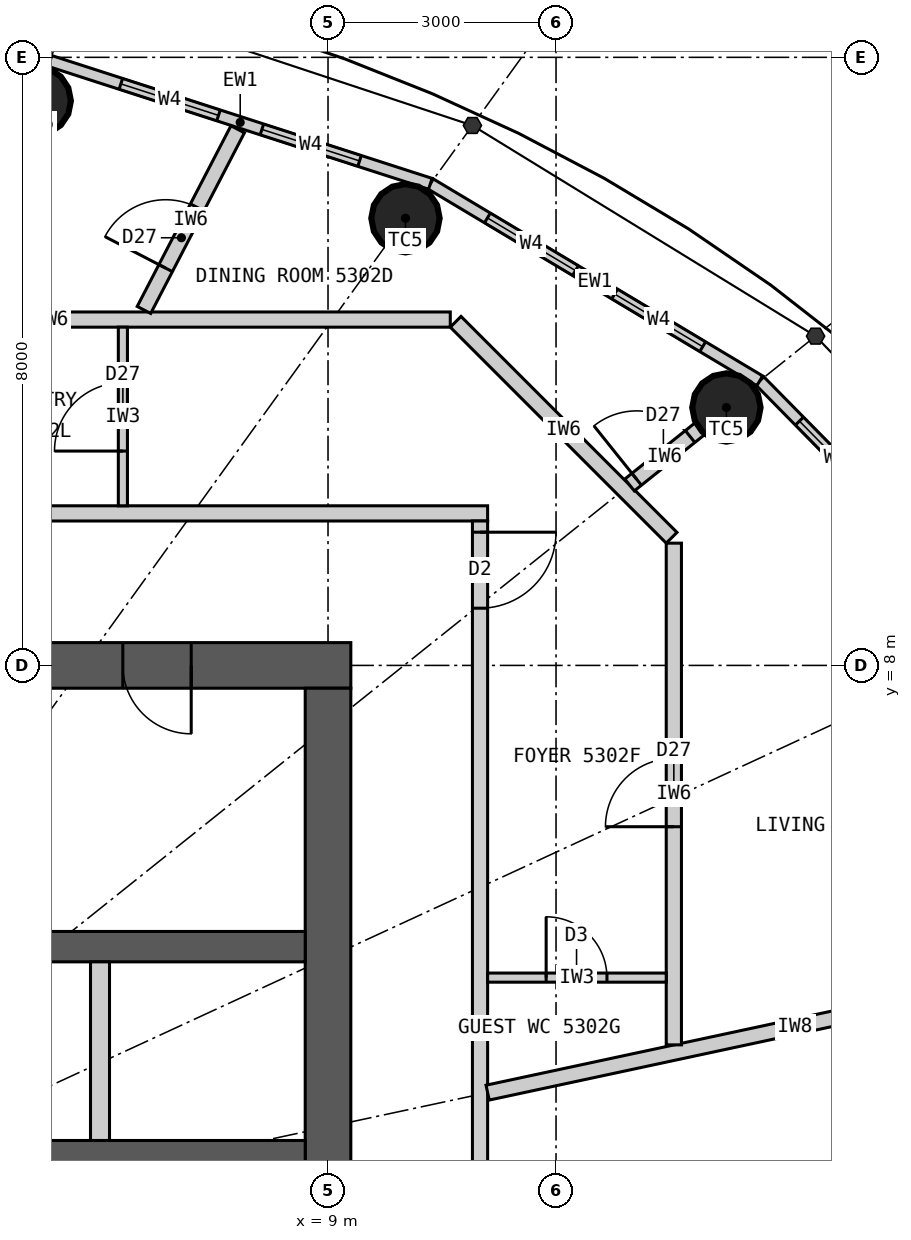
"""IFC4 building model, lengths in metres.
Left out: names, types, materials, properties, quantities, classifications, styles, units other than length and angle.
Written with IfcOpenShell. Run it as: python <this file> out.ifc"""

import sys

from ifc_helpers import new_model, si_unit, direction, frame, frame_2d, origin, origin_2d, place, context, subcontext, project, spatial, rectangle, circle, extrude, element, fill, save


model = new_model("IFC4")
c1 = context("Model", 3, precision=1e-05, world=origin(), true_north=direction((0.0, 1.0)))
c2 = subcontext(c1, "Body", "Model", "MODEL_VIEW")
j1 = project(units=[si_unit("LENGTHUNIT", "METRE"), si_unit("PLANEANGLEUNIT", "RADIAN")], contexts=[c1])
p1 = place(None, origin())
s1 = spatial("IfcSite", under=j1, at=p1, CompositionType="ELEMENT")
p2 = place(p1, origin())
s2 = spatial("IfcBuilding", under=s1, at=p2, CompositionType="ELEMENT")
p3 = place(p2, frame((0.0, 0.0, 199.5)))
s3 = spatial("IfcBuildingStorey", under=s2, at=p3, CompositionType="ELEMENT", Elevation=199.5)
for number, where, z_axis, x_axis in (
    (1, (14.241, 11.393, 0.0), (0.0, 0.0, 1.0), (1.0, 0.0, 0.0)),
    (2, (10.019, 13.883, 0.0), (0.0, 0.0, 1.0), (1.0, 0.0, 0.0)),
    (3, (5.167, 15.427, 0.0), (0.0, 0.0, 1.0), (1.0, 0.0, 0.0)),
):
    element("IfcColumn", number, at=place(p3, frame(where, z_axis=z_axis, x_axis=x_axis)), inside=s3, PredefinedType="COLUMN", context=c2, shape_type="SweptSolid", body=[
        extrude(circle(Radius=0.45, at=origin_2d()), origin(), (0.0, 0.0, 1.0), 3.3),
    ])
p4 = place(p3, frame((-9.3, 8.0, 0.0), z_axis=(0.0, 0.0, 1.0), x_axis=(1.0, 0.0, 0.0)))
e4 = element("IfcWall", 4, at=p4, inside=s3, PredefinedType="SHEAR", context=c2, shape_type="SweptSolid", body=[
    extrude(rectangle(XDim=18.6, YDim=0.6, at=frame_2d((9.3, 0.0))), origin(), (0.0, 0.0, 1.0), 3.3),
])
p5 = place(p4, frame((8.0, 0.0, 0.0)))
e5 = element("IfcOpeningElement", 5, at=p5, cuts=e4, PredefinedType="OPENING", context=c2, shape_type="SweptSolid", body=[
    extrude(rectangle(XDim=1.2, YDim=2.2, at=frame_2d((0.6, 1.1))), frame((0.0, 0.31, 0.0), z_axis=(0.0, -1.0, 0.0), x_axis=(1.0, 0.0, 0.0)), (0.0, 0.0, 1.0), 0.62),
])
p6 = place(p4, frame((15.6, 0.0, 0.0)))
e6 = element("IfcOpeningElement", 6, at=p6, cuts=e4, PredefinedType="OPENING", context=c2, shape_type="SweptSolid", body=[
    extrude(rectangle(XDim=0.9, YDim=2.2, at=frame_2d((0.45, 1.1))), frame((0.0, 0.31, 0.0), z_axis=(0.0, -1.0, 0.0), x_axis=(1.0, 0.0, 0.0)), (0.0, 0.0, 1.0), 0.62),
])
p7 = place(p3, frame((9.0, -7.7, 0.0), z_axis=(0.0, 0.0, 1.0), x_axis=(0.0, 1.0, 0.0)))
e7 = element("IfcWall", 7, at=p7, inside=s3, PredefinedType="SHEAR", context=c2, shape_type="SweptSolid", body=[
    extrude(rectangle(XDim=15.4, YDim=0.6, at=frame_2d((7.7, 0.0))), origin(), (0.0, 0.0, 1.0), 3.3),
])
p8 = place(p7, frame((6.8, 0.0, 0.0)))
e8 = element("IfcOpeningElement", 8, at=p8, cuts=e7, PredefinedType="OPENING", context=c2, shape_type="SweptSolid", body=[
    extrude(rectangle(XDim=1.8, YDim=2.2, at=frame_2d((0.9, 1.1))), frame((0.0, 0.31, 0.0), z_axis=(0.0, -1.0, 0.0), x_axis=(1.0, 0.0, 0.0)), (0.0, 0.0, 1.0), 0.62),
])
p9 = place(p3, frame((-8.7, 4.3, 0.0), z_axis=(0.0, 0.0, 1.0), x_axis=(1.0, 0.0, 0.0)))
e9 = element("IfcWall", 9, at=p9, inside=s3, PredefinedType="SHEAR", context=c2, shape_type="SweptSolid", body=[
    extrude(rectangle(XDim=17.4, YDim=0.4, at=frame_2d((8.7, 0.0))), origin(), (0.0, 0.0, 1.0), 3.3),
])
p10 = place(p3, frame((-8.7, 1.6, 0.0), z_axis=(0.0, 0.0, 1.0), x_axis=(1.0, 0.0, 0.0)))
e10 = element("IfcWall", 10, at=p10, inside=s3, PredefinedType="SHEAR", context=c2, shape_type="SweptSolid", body=[
    extrude(rectangle(XDim=17.4, YDim=0.3, at=frame_2d((8.7, 0.0))), origin(), (0.0, 0.0, 1.0), 3.3),
])
p11 = place(p10, frame((12.65, 0.0, 0.0)))
e11 = element("IfcOpeningElement", 11, at=p11, cuts=e10, PredefinedType="OPENING", context=c2, shape_type="SweptSolid", body=[
    extrude(rectangle(XDim=1.1, YDim=2.2, at=frame_2d((0.55, 1.1))), frame((0.0, 0.16, 0.0), z_axis=(0.0, -1.0, 0.0), x_axis=(1.0, 0.0, 0.0)), (0.0, 0.0, 1.0), 0.32),
])
p12 = place(p10, frame((3.75, 0.0, 0.0)))
e12 = element("IfcOpeningElement", 12, at=p12, cuts=e10, PredefinedType="OPENING", context=c2, shape_type="SweptSolid", body=[
    extrude(rectangle(XDim=0.9, YDim=2.2, at=frame_2d((0.45, 1.1))), frame((0.0, 0.16, 0.0), z_axis=(0.0, -1.0, 0.0), x_axis=(1.0, 0.0, 0.0)), (0.0, 0.0, 1.0), 0.32),
])
p13 = place(p10, frame((9.75, 0.0, 0.0)))
e13 = element("IfcOpeningElement", 13, at=p13, cuts=e10, PredefinedType="OPENING", context=c2, shape_type="SweptSolid", body=[
    extrude(rectangle(XDim=0.9, YDim=2.2, at=frame_2d((0.45, 1.1))), frame((0.0, 0.16, 0.0), z_axis=(0.0, -1.0, 0.0), x_axis=(1.0, 0.0, 0.0)), (0.0, 0.0, 1.0), 0.32),
])
p14 = place(p3, frame((6.0, 1.75, 0.0), z_axis=(0.0, 0.0, 1.0), x_axis=(0.0, 1.0, 0.0)))
e14 = element("IfcWall", 14, at=p14, inside=s3, PredefinedType="PARTITIONING", context=c2, shape_type="SweptSolid", body=[
    extrude(rectangle(XDim=2.35, YDim=0.25, at=frame_2d((1.175, 0.0))), origin(), (0.0, 0.0, 1.0), 3.3),
])
p15 = place(p3, frame((18.04, 8.332, 0.0), z_axis=(0.0, 0.0, 1.0), x_axis=(-0.701527379618, 0.712642501993, 0.0)))
e15 = element("IfcWall", 15, at=p15, inside=s3, PredefinedType="ELEMENTEDWALL", context=c2, shape_type="SweptSolid", body=[
    extrude(rectangle(XDim=4.788, YDim=0.15, at=frame_2d((2.394, 0.0))), origin(), (0.0, 0.0, 1.0), 3.12),
])
p16 = place(p15, frame((0.744, 0.0, 0.9)))
e16 = element("IfcOpeningElement", 16, at=p16, cuts=e15, PredefinedType="OPENING", context=c2, shape_type="SweptSolid", body=[
    extrude(rectangle(XDim=1.35, YDim=1.9, at=frame_2d((0.675, 0.95))), frame((0.0, 0.085, 0.0), z_axis=(0.0, -1.0, 0.0), x_axis=(1.0, 0.0, 0.0)), (0.0, 0.0, 1.0), 0.17),
])
p17 = place(p15, frame((2.694, 0.0, 0.9)))
e17 = element("IfcOpeningElement", 17, at=p17, cuts=e15, PredefinedType="OPENING", context=c2, shape_type="SweptSolid", body=[
    extrude(rectangle(XDim=1.35, YDim=1.9, at=frame_2d((0.675, 0.95))), frame((0.0, 0.085, 0.0), z_axis=(0.0, -1.0, 0.0), x_axis=(1.0, 0.0, 0.0)), (0.0, 0.0, 1.0), 0.17),
])
p18 = place(p3, frame((14.68, 11.744, 0.0), z_axis=(0.0, 0.0, 1.0), x_axis=(-0.85822150553, 0.513279502265, 0.0)))
e18 = element("IfcWall", 18, at=p18, inside=s3, PredefinedType="ELEMENTEDWALL", context=c2, shape_type="SweptSolid", body=[
    extrude(rectangle(XDim=5.05, YDim=0.15, at=frame_2d((2.525, 0.0))), origin(), (0.0, 0.0, 1.0), 3.12),
])
p19 = place(p18, frame((0.875, 0.0, 0.9)))
e19 = element("IfcOpeningElement", 19, at=p19, cuts=e18, PredefinedType="OPENING", context=c2, shape_type="SweptSolid", body=[
    extrude(rectangle(XDim=1.35, YDim=1.9, at=frame_2d((0.675, 0.95))), frame((0.0, 0.085, 0.0), z_axis=(0.0, -1.0, 0.0), x_axis=(1.0, 0.0, 0.0)), (0.0, 0.0, 1.0), 0.17),
])
p20 = place(p18, frame((2.825, 0.0, 0.9)))
e20 = element("IfcOpeningElement", 20, at=p20, cuts=e18, PredefinedType="OPENING", context=c2, shape_type="SweptSolid", body=[
    extrude(rectangle(XDim=1.35, YDim=1.9, at=frame_2d((0.675, 0.95))), frame((0.0, 0.085, 0.0), z_axis=(0.0, -1.0, 0.0), x_axis=(1.0, 0.0, 0.0)), (0.0, 0.0, 1.0), 0.17),
])
p21 = place(p3, frame((10.346, 14.336, 0.0), z_axis=(0.0, 0.0, 1.0), x_axis=(-0.951644702515, 0.307200846638, 0.0)))
e21 = element("IfcWall", 21, at=p21, inside=s3, PredefinedType="ELEMENTEDWALL", context=c2, shape_type="SweptSolid", body=[
    extrude(rectangle(XDim=5.258, YDim=0.15, at=frame_2d((2.629, 0.0))), origin(), (0.0, 0.0, 1.0), 3.12),
])
p22 = place(p21, frame((0.979, 0.0, 0.9)))
e22 = element("IfcOpeningElement", 22, at=p22, cuts=e21, PredefinedType="OPENING", context=c2, shape_type="SweptSolid", body=[
    extrude(rectangle(XDim=1.35, YDim=1.9, at=frame_2d((0.675, 0.95))), frame((0.0, 0.085, 0.0), z_axis=(0.0, -1.0, 0.0), x_axis=(1.0, 0.0, 0.0)), (0.0, 0.0, 1.0), 0.17),
])
p23 = place(p21, frame((2.929, 0.0, 0.9)))
e23 = element("IfcOpeningElement", 23, at=p23, cuts=e21, PredefinedType="OPENING", context=c2, shape_type="SweptSolid", body=[
    extrude(rectangle(XDim=1.35, YDim=1.9, at=frame_2d((0.675, 0.95))), frame((0.0, 0.085, 0.0), z_axis=(0.0, -1.0, 0.0), x_axis=(1.0, 0.0, 0.0)), (0.0, 0.0, 1.0), 0.17),
])
p24 = place(p3, frame((-11.1, 10.0, 0.0), z_axis=(0.0, 0.0, 1.0), x_axis=(1.0, 0.0, 0.0)))
e24 = element("IfcWall", 24, at=p24, inside=s3, PredefinedType="PARTITIONING", context=c2, shape_type="SweptSolid", body=[
    extrude(rectangle(XDim=22.2, YDim=0.2, at=frame_2d((11.1, 0.0))), origin(), (0.0, 0.0, 1.0), 3.12),
])
p25 = place(p24, frame((2.309, 0.0, 0.0)))
e25 = element("IfcOpeningElement", 25, at=p25, cuts=e24, PredefinedType="OPENING", context=c2, shape_type="SweptSolid", body=[
    extrude(rectangle(XDim=1.0, YDim=2.2, at=frame_2d((0.5, 1.1))), frame((0.0, 0.11, 0.0), z_axis=(0.0, -1.0, 0.0), x_axis=(1.0, 0.0, 0.0)), (0.0, 0.0, 1.0), 0.22),
])
p26 = place(p3, frame((11.0, -9.9, 0.0), z_axis=(0.0, 0.0, 1.0), x_axis=(0.0, 1.0, 0.0)))
e26 = element("IfcWall", 26, at=p26, inside=s3, PredefinedType="PARTITIONING", context=c2, shape_type="SweptSolid", body=[
    extrude(rectangle(XDim=19.8, YDim=0.2, at=frame_2d((9.9, 0.0))), origin(), (0.0, 0.0, 1.0), 3.12),
])
p27 = place(p26, frame((10.32, 0.0, 0.0)))
e27 = element("IfcOpeningElement", 27, at=p27, cuts=e26, PredefinedType="OPENING", context=c2, shape_type="SweptSolid", body=[
    extrude(rectangle(XDim=1.0, YDim=2.2, at=frame_2d((0.5, 1.1))), frame((0.0, 0.11, 0.0), z_axis=(0.0, -1.0, 0.0), x_axis=(1.0, 0.0, 0.0)), (0.0, 0.0, 1.0), 0.22),
])
p28 = place(p26, frame((18.653, 0.0, 0.0)))
e28 = element("IfcOpeningElement", 28, at=p28, cuts=e26, PredefinedType="OPENING", context=c2, shape_type="SweptSolid", body=[
    extrude(rectangle(XDim=1.0, YDim=2.2, at=frame_2d((0.5, 1.1))), frame((0.0, 0.11, 0.0), z_axis=(0.0, -1.0, 0.0), x_axis=(1.0, 0.0, 0.0)), (0.0, 0.0, 1.0), 0.22),
])
p29 = place(p26, frame((0.379, 0.0, 0.0)))
e29 = element("IfcOpeningElement", 29, at=p29, cuts=e26, PredefinedType="OPENING", context=c2, shape_type="SweptSolid", body=[
    extrude(rectangle(XDim=1.0, YDim=2.2, at=frame_2d((0.5, 1.1))), frame((0.0, 0.11, 0.0), z_axis=(0.0, -1.0, 0.0), x_axis=(1.0, 0.0, 0.0)), (0.0, 0.0, 1.0), 0.22),
])
p30 = place(p3, frame((11.1, 2.379, 0.0), z_axis=(0.0, 0.0, 1.0), x_axis=(0.977789888126, 0.209587534647, 0.0)))
e30 = element("IfcWall", 30, at=p30, inside=s3, PredefinedType="PARTITIONING", context=c2, shape_type="SweptSolid", body=[
    extrude(rectangle(XDim=8.273, YDim=0.2, at=frame_2d((4.136, 0.0))), origin(), (0.0, 0.0, 1.0), 2.42),
])
p31 = place(p3, frame((13.55, 3.008, 0.0), z_axis=(0.0, 0.0, 1.0), x_axis=(0.0, 1.0, 0.0)))
e31 = element("IfcWall", 31, at=p31, inside=s3, PredefinedType="PARTITIONING", context=c2, shape_type="SweptSolid", body=[
    extrude(rectangle(XDim=6.601, YDim=0.2, at=frame_2d((3.3, 0.0))), origin(), (0.0, 0.0, 1.0), 3.12),
])
p32 = place(p31, frame((2.87, 0.0, 0.0)))
e32 = element("IfcOpeningElement", 32, at=p32, cuts=e31, PredefinedType="OPENING", context=c2, shape_type="SweptSolid", body=[
    extrude(rectangle(XDim=0.9, YDim=2.1, at=frame_2d((0.45, 1.05))), frame((0.0, 0.11, 0.0), z_axis=(0.0, -1.0, 0.0), x_axis=(1.0, 0.0, 0.0)), (0.0, 0.0, 1.0), 0.22),
])
p33 = place(p3, frame((13.521, 9.679, 0.0), z_axis=(0.0, 0.0, 1.0), x_axis=(-0.707106781187, 0.707106781187, 0.0)))
e33 = element("IfcWall", 33, at=p33, inside=s3, PredefinedType="PARTITIONING", context=c2, shape_type="SweptSolid", body=[
    extrude(rectangle(XDim=4.019, YDim=0.2, at=frame_2d((2.009, 0.0))), origin(), (0.0, 0.0, 1.0), 3.12),
])
p34 = place(p3, frame((10.609, 12.55, 0.0), z_axis=(0.0, 0.0, 1.0), x_axis=(-1.0, 0.0, 0.0)))
e34 = element("IfcWall", 34, at=p34, inside=s3, PredefinedType="PARTITIONING", context=c2, shape_type="SweptSolid", body=[
    extrude(rectangle(XDim=10.508, YDim=0.2, at=frame_2d((5.254, 0.0))), origin(), (0.0, 0.0, 1.0), 3.12),
])
p35 = place(p34, frame((6.588, 0.0, 0.0)))
e35 = element("IfcOpeningElement", 35, at=p35, cuts=e34, PredefinedType="OPENING", context=c2, shape_type="SweptSolid", body=[
    extrude(rectangle(XDim=0.9, YDim=2.1, at=frame_2d((0.45, 1.05))), frame((0.0, 0.11, 0.0), z_axis=(0.0, -1.0, 0.0), x_axis=(1.0, 0.0, 0.0)), (0.0, 0.0, 1.0), 0.22),
])
p36 = place(p34, frame((8.308, 0.0, 0.0)))
e36 = element("IfcOpeningElement", 36, at=p36, cuts=e34, PredefinedType="OPENING", context=c2, shape_type="SweptSolid", body=[
    extrude(rectangle(XDim=0.8, YDim=2.1, at=frame_2d((0.4, 1.05))), frame((0.0, 0.11, 0.0), z_axis=(0.0, -1.0, 0.0), x_axis=(1.0, 0.0, 0.0)), (0.0, 0.0, 1.0), 0.22),
])
p37 = place(p3, frame((12.968, 10.374, 0.0), z_axis=(0.0, 0.0, 1.0), x_axis=(0.780888968944, 0.624669847345, 0.0)))
e37 = element("IfcWall", 37, at=p37, inside=s3, PredefinedType="PARTITIONING", context=c2, shape_type="SweptSolid", body=[
    extrude(rectangle(XDim=1.181, YDim=0.2, at=frame_2d((0.591, 0.0))), origin(), (0.0, 0.0, 1.0), 2.42),
])
p38 = place(p37, frame((0.12, 0.0, 0.0)))
e38 = element("IfcOpeningElement", 38, at=p38, cuts=e37, PredefinedType="OPENING", context=c2, shape_type="SweptSolid", body=[
    extrude(rectangle(XDim=0.9, YDim=2.1, at=frame_2d((0.45, 1.05))), frame((0.0, 0.11, 0.0), z_axis=(0.0, -1.0, 0.0), x_axis=(1.0, 0.0, 0.0)), (0.0, 0.0, 1.0), 0.22),
])
p39 = place(p3, frame((6.578, 12.677, 0.0), z_axis=(0.0, 0.0, 1.0), x_axis=(0.460620531465, 0.887597164255, 0.0)))
e39 = element("IfcWall", 39, at=p39, inside=s3, PredefinedType="PARTITIONING", context=c2, shape_type="SweptSolid", body=[
    extrude(rectangle(XDim=2.678, YDim=0.2, at=frame_2d((1.339, 0.0))), origin(), (0.0, 0.0, 1.0), 3.12),
])
p40 = place(p39, frame((0.62, 0.0, 0.0)))
e40 = element("IfcOpeningElement", 40, at=p40, cuts=e39, PredefinedType="OPENING", context=c2, shape_type="SweptSolid", body=[
    extrude(rectangle(XDim=0.9, YDim=2.1, at=frame_2d((0.45, 1.05))), frame((0.0, 0.11, 0.0), z_axis=(0.0, -1.0, 0.0), x_axis=(1.0, 0.0, 0.0)), (0.0, 0.0, 1.0), 0.22),
])
p41 = place(p3, frame((11.1, 3.893, 0.0), z_axis=(0.0, 0.0, 1.0), x_axis=(1.0, 0.0, 0.0)))
e41 = element("IfcWall", 41, at=p41, inside=s3, PredefinedType="PARTITIONING", context=c2, shape_type="SweptSolid", body=[
    extrude(rectangle(XDim=2.35, YDim=0.12, at=frame_2d((1.175, 0.0))), origin(), (0.0, 0.0, 1.0), 3.12),
])
p42 = place(p41, frame((0.77, 0.0, 0.0)))
e42 = element("IfcOpeningElement", 42, at=p42, cuts=e41, PredefinedType="OPENING", context=c2, shape_type="SweptSolid", body=[
    extrude(rectangle(XDim=0.8, YDim=2.1, at=frame_2d((0.4, 1.05))), frame((0.0, 0.07, 0.0), z_axis=(0.0, -1.0, 0.0), x_axis=(1.0, 0.0, 0.0)), (0.0, 0.0, 1.0), 0.14),
])
p43 = place(p3, frame((6.301, 10.1, 0.0), z_axis=(0.0, 0.0, 1.0), x_axis=(0.0, 1.0, 0.0)))
e43 = element("IfcWall", 43, at=p43, inside=s3, PredefinedType="PARTITIONING", context=c2, shape_type="SweptSolid", body=[
    extrude(rectangle(XDim=2.35, YDim=0.12, at=frame_2d((1.175, 0.0))), origin(), (0.0, 0.0, 1.0), 3.12),
])
p44 = place(p43, frame((0.72, 0.0, 0.0)))
e44 = element("IfcOpeningElement", 44, at=p44, cuts=e43, PredefinedType="OPENING", context=c2, shape_type="SweptSolid", body=[
    extrude(rectangle(XDim=0.9, YDim=2.1, at=frame_2d((0.45, 1.05))), frame((0.0, 0.07, 0.0), z_axis=(0.0, -1.0, 0.0), x_axis=(1.0, 0.0, 0.0)), (0.0, 0.0, 1.0), 0.14),
])
p45 = place(p17, origin())
e45 = element("IfcWindow", 45, at=p45, inside=s3, PartitioningType="SINGLE_PANEL", PredefinedType="WINDOW", context=c2, shape_type="SweptSolid", body=[
    extrude(rectangle(XDim=1.35, YDim=1.9, at=frame_2d((0.675, 0.95))), frame((0.0, 0.03, 0.0), z_axis=(0.0, -1.0, 0.0), x_axis=(1.0, 0.0, 0.0)), (0.0, 0.0, 1.0), 0.06),
])
fill(e17, e45)
p46 = place(p19, origin())
e46 = element("IfcWindow", 46, at=p46, inside=s3, PartitioningType="SINGLE_PANEL", PredefinedType="WINDOW", context=c2, shape_type="SweptSolid", body=[
    extrude(rectangle(XDim=1.35, YDim=1.9, at=frame_2d((0.675, 0.95))), frame((0.0, 0.03, 0.0), z_axis=(0.0, -1.0, 0.0), x_axis=(1.0, 0.0, 0.0)), (0.0, 0.0, 1.0), 0.06),
])
fill(e19, e46)
p47 = place(p20, origin())
e47 = element("IfcWindow", 47, at=p47, inside=s3, PartitioningType="SINGLE_PANEL", PredefinedType="WINDOW", context=c2, shape_type="SweptSolid", body=[
    extrude(rectangle(XDim=1.35, YDim=1.9, at=frame_2d((0.675, 0.95))), frame((0.0, 0.03, 0.0), z_axis=(0.0, -1.0, 0.0), x_axis=(1.0, 0.0, 0.0)), (0.0, 0.0, 1.0), 0.06),
])
fill(e20, e47)
p48 = place(p22, origin())
e48 = element("IfcWindow", 48, at=p48, inside=s3, PartitioningType="SINGLE_PANEL", PredefinedType="WINDOW", context=c2, shape_type="SweptSolid", body=[
    extrude(rectangle(XDim=1.35, YDim=1.9, at=frame_2d((0.675, 0.95))), frame((0.0, 0.03, 0.0), z_axis=(0.0, -1.0, 0.0), x_axis=(1.0, 0.0, 0.0)), (0.0, 0.0, 1.0), 0.06),
])
fill(e22, e48)
p49 = place(p23, origin())
e49 = element("IfcWindow", 49, at=p49, inside=s3, PartitioningType="SINGLE_PANEL", PredefinedType="WINDOW", context=c2, shape_type="SweptSolid", body=[
    extrude(rectangle(XDim=1.35, YDim=1.9, at=frame_2d((0.675, 0.95))), frame((0.0, 0.03, 0.0), z_axis=(0.0, -1.0, 0.0), x_axis=(1.0, 0.0, 0.0)), (0.0, 0.0, 1.0), 0.06),
])
fill(e23, e49)
p50 = place(p28, origin())
e50 = element("IfcDoor", 50, at=p50, inside=s3, OperationType="SINGLE_SWING_RIGHT", PredefinedType="DOOR", context=c2, shape_type="SweptSolid", body=[
    extrude(rectangle(XDim=1.0, YDim=2.2, at=frame_2d((0.5, 1.1))), frame((0.0, 0.025, 0.0), z_axis=(0.0, -1.0, 0.0), x_axis=(1.0, 0.0, 0.0)), (0.0, 0.0, 1.0), 0.05),
])
fill(e28, e50)
p51 = place(p42, origin())
e51 = element("IfcDoor", 51, at=p51, inside=s3, OperationType="SINGLE_SWING_LEFT", PredefinedType="DOOR", context=c2, shape_type="SweptSolid", body=[
    extrude(rectangle(XDim=0.8, YDim=2.1, at=frame_2d((0.4, 1.05))), frame((0.0, 0.025, 0.0), z_axis=(0.0, -1.0, 0.0), x_axis=(1.0, 0.0, 0.0)), (0.0, 0.0, 1.0), 0.05),
])
fill(e42, e51)
p52 = place(p44, origin())
e52 = element("IfcDoor", 52, at=p52, inside=s3, OperationType="SINGLE_SWING_LEFT", PredefinedType="DOOR", context=c2, shape_type="SweptSolid", body=[
    extrude(rectangle(XDim=0.9, YDim=2.1, at=frame_2d((0.45, 1.05))), frame((0.0, 0.025, 0.0), z_axis=(0.0, -1.0, 0.0), x_axis=(1.0, 0.0, 0.0)), (0.0, 0.0, 1.0), 0.05),
])
fill(e44, e52)
p53 = place(p32, origin())
e53 = element("IfcDoor", 53, at=p53, inside=s3, OperationType="SINGLE_SWING_LEFT", PredefinedType="DOOR", context=c2, shape_type="SweptSolid", body=[
    extrude(rectangle(XDim=0.9, YDim=2.1, at=frame_2d((0.45, 1.05))), frame((0.0, 0.025, 0.0), z_axis=(0.0, -1.0, 0.0), x_axis=(1.0, 0.0, 0.0)), (0.0, 0.0, 1.0), 0.05),
])
fill(e32, e53)
p54 = place(p38, origin())
e54 = element("IfcDoor", 54, at=p54, inside=s3, OperationType="SINGLE_SWING_LEFT", PredefinedType="DOOR", context=c2, shape_type="SweptSolid", body=[
    extrude(rectangle(XDim=0.9, YDim=2.1, at=frame_2d((0.45, 1.05))), frame((0.0, 0.025, 0.0), z_axis=(0.0, -1.0, 0.0), x_axis=(1.0, 0.0, 0.0)), (0.0, 0.0, 1.0), 0.05),
])
fill(e38, e54)
p55 = place(p40, origin())
e55 = element("IfcDoor", 55, at=p55, inside=s3, OperationType="SINGLE_SWING_LEFT", PredefinedType="DOOR", context=c2, shape_type="SweptSolid", body=[
    extrude(rectangle(XDim=0.9, YDim=2.1, at=frame_2d((0.45, 1.05))), frame((0.0, 0.025, 0.0), z_axis=(0.0, -1.0, 0.0), x_axis=(1.0, 0.0, 0.0)), (0.0, 0.0, 1.0), 0.05),
])
fill(e40, e55)
p56 = place(p6, origin())
e56 = element("IfcDoor", 56, at=p56, inside=s3, OperationType="SINGLE_SWING_RIGHT", PredefinedType="DOOR", context=c2, shape_type="SweptSolid", body=[
    extrude(rectangle(XDim=0.9, YDim=2.2, at=frame_2d((0.45, 1.1))), frame((0.0, 0.025, 0.0), z_axis=(0.0, -1.0, 0.0), x_axis=(1.0, 0.0, 0.0)), (0.0, 0.0, 1.0), 0.05),
])
fill(e6, e56)
save(model, sys.argv[1])
